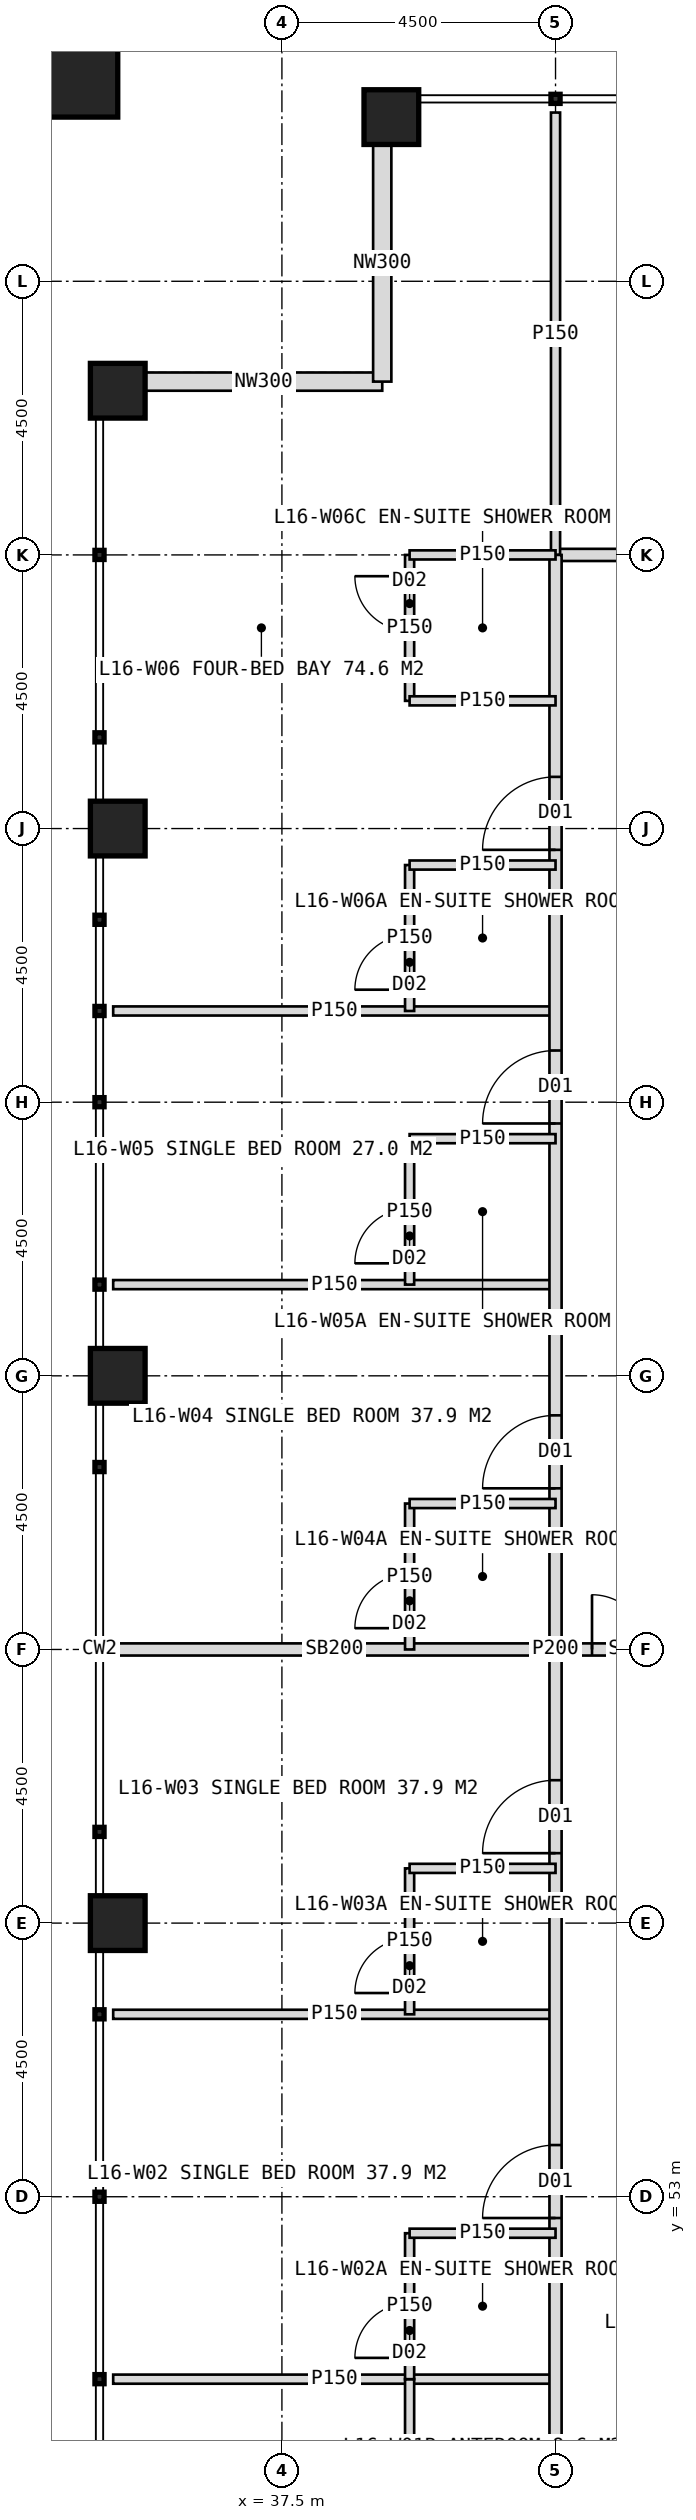
"""IFC4 building model, lengths in metres.
Left out: names, types, materials, properties, quantities, classifications, styles, units other than length and angle.
Written with IfcOpenShell. Run it as: python <this file> out.ifc"""

import sys

from ifc_helpers import new_model, si_unit, direction, frame, frame_2d, origin, origin_2d, place, context, subcontext, project, spatial, rectangle, hollow_rectangle, extrude, element, fill, save


model = new_model("IFC4")
c1 = context("Model", 3, precision=1e-05, world=origin(), true_north=direction((0.0, 1.0)))
c2 = subcontext(c1, "Body", "Model", "MODEL_VIEW")
j1 = project(units=[si_unit("LENGTHUNIT", "METRE"), si_unit("PLANEANGLEUNIT", "RADIAN")], contexts=[c1])
p1 = place(None, origin())
s1 = spatial("IfcSite", under=j1, at=p1, CompositionType="ELEMENT")
p2 = place(p1, origin())
s2 = spatial("IfcBuilding", under=s1, at=p2, CompositionType="ELEMENT")
p3 = place(p2, frame((0.0, 0.0, 71.0)))
s3 = spatial("IfcBuildingStorey", under=s2, at=p3, CompositionType="ELEMENT", Elevation=71.0)
for number, where, z_axis, x_axis in (
    (1, (39.3, 87.2, 0.0), (0.0, 0.0, 1.0), (1.0, 0.0, 0.0)),
    (2, (34.8, 57.5, 0.0), (0.0, 0.0, 1.0), (1.0, 0.0, 0.0)),
    (3, (34.8, 66.5, 0.0), (0.0, 0.0, 1.0), (1.0, 0.0, 0.0)),
    (4, (34.8, 75.5, 0.0), (0.0, 0.0, 1.0), (1.0, 0.0, 0.0)),
    (5, (34.8, 82.7, 0.0), (0.0, 0.0, 1.0), (1.0, 0.0, 0.0)),
):
    element("IfcColumn", number, at=place(p3, frame(where, z_axis=z_axis, x_axis=x_axis)), inside=s3, PredefinedType="COLUMN", context=c2, shape_type="SweptSolid", body=[
        extrude(hollow_rectangle(XDim=0.9, YDim=0.9, WallThickness=0.08, at=origin_2d()), origin(), (0.0, 0.0, 1.0), 4.0),
    ])
p4 = place(p3, frame((33.9, 88.1, 0.0), z_axis=(0.0, 0.0, 1.0), x_axis=(1.0, 0.0, 0.0)))
e6 = element("IfcColumn", 6, at=p4, inside=s3, PredefinedType="COLUMN", context=c2, shape_type="SweptSolid", body=[
    extrude(hollow_rectangle(XDim=1.8, YDim=1.8, WallThickness=0.1, at=origin_2d()), origin(), (0.0, 0.0, 1.0), 4.0),
])
for number, where, z_axis, x_axis in (
    (7, (35.25, 82.85, 0.0), (0.0, 0.0, 1.0), (1.0, 0.0, 0.0)),
    (8, (39.15, 82.85, 0.0), (0.0, 0.0, 1.0), (0.0, 1.0, 0.0)),
):
    element("IfcWall", number, at=place(p3, frame(where, z_axis=z_axis, x_axis=x_axis)), inside=s3, PredefinedType="ELEMENTEDWALL", context=c2, shape_type="SweptSolid", body=[
        extrude(rectangle(XDim=3.9, YDim=0.3, at=frame_2d((1.95, 0.0))), origin(), (0.0, 0.0, 1.0), 2.95),
    ])
p5 = place(p3, frame((42.0, 80.0, 0.0), z_axis=(0.0, 0.0, 1.0), x_axis=(1.0, 0.0, 0.0)))
e9 = element("IfcWall", 9, at=p5, inside=s3, PredefinedType="PARTITIONING", context=c2, shape_type="SweptSolid", body=[
    extrude(rectangle(XDim=36.0, YDim=0.2, at=frame_2d((18.0, 0.0))), origin(), (0.0, 0.0, 1.0), 3.75),
])
p6 = place(p5, frame((3.9, 0.0, 0.0)))
e10 = element("IfcOpeningElement", 10, at=p6, cuts=e9, PredefinedType="OPENING", context=c2, shape_type="SweptSolid", body=[
    extrude(rectangle(XDim=1.2, YDim=2.2, at=frame_2d((0.6, 1.1))), frame((0.0, 0.11, 0.0), z_axis=(0.0, -1.0, 0.0), x_axis=(1.0, 0.0, 0.0)), (0.0, 0.0, 1.0), 0.22),
])
p7 = place(p5, frame((11.65, 0.0, 0.0)))
e11 = element("IfcOpeningElement", 11, at=p7, cuts=e9, PredefinedType="OPENING", context=c2, shape_type="SweptSolid", body=[
    extrude(rectangle(XDim=1.2, YDim=2.2, at=frame_2d((0.6, 1.1))), frame((0.0, 0.11, 0.0), z_axis=(0.0, -1.0, 0.0), x_axis=(1.0, 0.0, 0.0)), (0.0, 0.0, 1.0), 0.22),
])
p8 = place(p5, frame((17.65, 0.0, 0.0)))
e12 = element("IfcOpeningElement", 12, at=p8, cuts=e9, PredefinedType="OPENING", context=c2, shape_type="SweptSolid", body=[
    extrude(rectangle(XDim=1.2, YDim=2.2, at=frame_2d((0.6, 1.1))), frame((0.0, 0.11, 0.0), z_axis=(0.0, -1.0, 0.0), x_axis=(1.0, 0.0, 0.0)), (0.0, 0.0, 1.0), 0.22),
])
p9 = place(p5, frame((23.65, 0.0, 0.0)))
e13 = element("IfcOpeningElement", 13, at=p9, cuts=e9, PredefinedType="OPENING", context=c2, shape_type="SweptSolid", body=[
    extrude(rectangle(XDim=1.2, YDim=2.2, at=frame_2d((0.6, 1.1))), frame((0.0, 0.11, 0.0), z_axis=(0.0, -1.0, 0.0), x_axis=(1.0, 0.0, 0.0)), (0.0, 0.0, 1.0), 0.22),
])
p10 = place(p5, frame((29.65, 0.0, 0.0)))
e14 = element("IfcOpeningElement", 14, at=p10, cuts=e9, PredefinedType="OPENING", context=c2, shape_type="SweptSolid", body=[
    extrude(rectangle(XDim=1.2, YDim=2.2, at=frame_2d((0.6, 1.1))), frame((0.0, 0.11, 0.0), z_axis=(0.0, -1.0, 0.0), x_axis=(1.0, 0.0, 0.0)), (0.0, 0.0, 1.0), 0.22),
])
for number, where, z_axis, x_axis in (
    (15, (42.0, 80.0, 0.0), (0.0, 0.0, 1.0), (0.0, 1.0, 0.0)),
    (16, (42.0, 50.0, 0.0), (0.0, 0.0, 1.0), (-1.0, 0.0, 0.0)),
    (17, (42.0, 56.0, 0.0), (0.0, 0.0, 1.0), (-1.0, 0.0, 0.0)),
):
    element("IfcWall", number, at=place(p3, frame(where, z_axis=z_axis, x_axis=x_axis)), inside=s3, PredefinedType="PARTITIONING", context=c2, shape_type="SweptSolid", body=[
        extrude(rectangle(XDim=7.275, YDim=0.15, at=frame_2d((3.637, 0.0))), origin(), (0.0, 0.0, 1.0), 3.75),
    ])
p11 = place(p3, frame((42.0, 62.0, 0.0), z_axis=(0.0, 0.0, 1.0), x_axis=(-1.0, 0.0, 0.0)))
e18 = element("IfcWall", 18, at=p11, inside=s3, PredefinedType="SOLIDWALL", context=c2, shape_type="SweptSolid", body=[
    extrude(rectangle(XDim=7.275, YDim=0.2, at=frame_2d((3.637, 0.0))), origin(), (0.0, 0.0, 1.0), 2.75),
])
for number, where, z_axis, x_axis in (
    (19, (42.0, 68.0, 0.0), (0.0, 0.0, 1.0), (-1.0, 0.0, 0.0)),
    (20, (42.0, 72.5, 0.0), (0.0, 0.0, 1.0), (-1.0, 0.0, 0.0)),
):
    element("IfcWall", number, at=place(p3, frame(where, z_axis=z_axis, x_axis=x_axis)), inside=s3, PredefinedType="PARTITIONING", context=c2, shape_type="SweptSolid", body=[
        extrude(rectangle(XDim=7.275, YDim=0.15, at=frame_2d((3.637, 0.0))), origin(), (0.0, 0.0, 1.0), 3.75),
    ])
p12 = place(p3, frame((42.0, 44.0, 0.0), z_axis=(0.0, 0.0, 1.0), x_axis=(0.0, 1.0, 0.0)))
e21 = element("IfcWall", 21, at=p12, inside=s3, PredefinedType="PARTITIONING", context=c2, shape_type="SweptSolid", body=[
    extrude(rectangle(XDim=36.0, YDim=0.2, at=frame_2d((18.0, 0.0))), origin(), (0.0, 0.0, 1.0), 3.75),
])
p13 = place(p12, frame((2.65, 0.0, 0.0)))
e22 = element("IfcOpeningElement", 22, at=p13, cuts=e21, PredefinedType="OPENING", context=c2, shape_type="SweptSolid", body=[
    extrude(rectangle(XDim=1.2, YDim=2.2, at=frame_2d((0.6, 1.1))), frame((0.0, 0.11, 0.0), z_axis=(0.0, -1.0, 0.0), x_axis=(1.0, 0.0, 0.0)), (0.0, 0.0, 1.0), 0.22),
])
p14 = place(p12, frame((8.65, 0.0, 0.0)))
e23 = element("IfcOpeningElement", 23, at=p14, cuts=e21, PredefinedType="OPENING", context=c2, shape_type="SweptSolid", body=[
    extrude(rectangle(XDim=1.2, YDim=2.2, at=frame_2d((0.6, 1.1))), frame((0.0, 0.11, 0.0), z_axis=(0.0, -1.0, 0.0), x_axis=(1.0, 0.0, 0.0)), (0.0, 0.0, 1.0), 0.22),
])
p15 = place(p12, frame((14.65, 0.0, 0.0)))
e24 = element("IfcOpeningElement", 24, at=p15, cuts=e21, PredefinedType="OPENING", context=c2, shape_type="SweptSolid", body=[
    extrude(rectangle(XDim=1.2, YDim=2.2, at=frame_2d((0.6, 1.1))), frame((0.0, 0.11, 0.0), z_axis=(0.0, -1.0, 0.0), x_axis=(1.0, 0.0, 0.0)), (0.0, 0.0, 1.0), 0.22),
])
p16 = place(p12, frame((20.65, 0.0, 0.0)))
e25 = element("IfcOpeningElement", 25, at=p16, cuts=e21, PredefinedType="OPENING", context=c2, shape_type="SweptSolid", body=[
    extrude(rectangle(XDim=1.2, YDim=2.2, at=frame_2d((0.6, 1.1))), frame((0.0, 0.11, 0.0), z_axis=(0.0, -1.0, 0.0), x_axis=(1.0, 0.0, 0.0)), (0.0, 0.0, 1.0), 0.22),
])
p17 = place(p12, frame((26.65, 0.0, 0.0)))
e26 = element("IfcOpeningElement", 26, at=p17, cuts=e21, PredefinedType="OPENING", context=c2, shape_type="SweptSolid", body=[
    extrude(rectangle(XDim=1.2, YDim=2.2, at=frame_2d((0.6, 1.1))), frame((0.0, 0.11, 0.0), z_axis=(0.0, -1.0, 0.0), x_axis=(1.0, 0.0, 0.0)), (0.0, 0.0, 1.0), 0.22),
])
p18 = place(p12, frame((31.15, 0.0, 0.0)))
e27 = element("IfcOpeningElement", 27, at=p18, cuts=e21, PredefinedType="OPENING", context=c2, shape_type="SweptSolid", body=[
    extrude(rectangle(XDim=1.2, YDim=2.2, at=frame_2d((0.6, 1.1))), frame((0.0, 0.11, 0.0), z_axis=(0.0, -1.0, 0.0), x_axis=(1.0, 0.0, 0.0)), (0.0, 0.0, 1.0), 0.22),
])
p19 = place(p3, frame((39.6, 46.4, 0.0), z_axis=(0.0, 0.0, 1.0), x_axis=(0.0, 1.0, 0.0)))
e28 = element("IfcWall", 28, at=p19, inside=s3, PredefinedType="PARTITIONING", context=c2, shape_type="SweptSolid", body=[
    extrude(rectangle(XDim=3.6, YDim=0.15, at=frame_2d((1.8, 0.0))), origin(), (0.0, 0.0, 1.0), 3.75),
])
p20 = place(p19, frame((0.25, 0.0, 0.0)))
e29 = element("IfcOpeningElement", 29, at=p20, cuts=e28, PredefinedType="OPENING", context=c2, shape_type="SweptSolid", body=[
    extrude(rectangle(XDim=1.2, YDim=2.2, at=frame_2d((0.6, 1.1))), frame((0.0, 0.085, 0.0), z_axis=(0.0, -1.0, 0.0), x_axis=(1.0, 0.0, 0.0)), (0.0, 0.0, 1.0), 0.17),
])
p21 = place(p3, frame((39.6, 50.0, 0.0), z_axis=(0.0, 0.0, 1.0), x_axis=(0.0, 1.0, 0.0)))
e30 = element("IfcWall", 30, at=p21, inside=s3, PredefinedType="PARTITIONING", context=c2, shape_type="SweptSolid", body=[
    extrude(rectangle(XDim=2.4, YDim=0.15, at=frame_2d((1.2, 0.0))), origin(), (0.0, 0.0, 1.0), 3.75),
])
p22 = place(p21, frame((0.35, 0.0, 0.0)))
e31 = element("IfcOpeningElement", 31, at=p22, cuts=e30, PredefinedType="OPENING", context=c2, shape_type="SweptSolid", body=[
    extrude(rectangle(XDim=0.9, YDim=2.1, at=frame_2d((0.45, 1.05))), frame((0.0, 0.085, 0.0), z_axis=(0.0, -1.0, 0.0), x_axis=(1.0, 0.0, 0.0)), (0.0, 0.0, 1.0), 0.17),
])
p23 = place(p3, frame((42.0, 52.4, 0.0), z_axis=(0.0, 0.0, 1.0), x_axis=(-1.0, 0.0, 0.0)))
e32 = element("IfcWall", 32, at=p23, inside=s3, PredefinedType="PARTITIONING", context=c2, shape_type="SweptSolid", body=[
    extrude(rectangle(XDim=2.4, YDim=0.15, at=frame_2d((1.2, 0.0))), origin(), (0.0, 0.0, 1.0), 3.75),
])
p24 = place(p3, frame((39.6, 56.0, 0.0), z_axis=(0.0, 0.0, 1.0), x_axis=(0.0, 1.0, 0.0)))
e33 = element("IfcWall", 33, at=p24, inside=s3, PredefinedType="PARTITIONING", context=c2, shape_type="SweptSolid", body=[
    extrude(rectangle(XDim=2.4, YDim=0.15, at=frame_2d((1.2, 0.0))), origin(), (0.0, 0.0, 1.0), 3.75),
])
p25 = place(p24, frame((0.35, 0.0, 0.0)))
e34 = element("IfcOpeningElement", 34, at=p25, cuts=e33, PredefinedType="OPENING", context=c2, shape_type="SweptSolid", body=[
    extrude(rectangle(XDim=0.9, YDim=2.1, at=frame_2d((0.45, 1.05))), frame((0.0, 0.085, 0.0), z_axis=(0.0, -1.0, 0.0), x_axis=(1.0, 0.0, 0.0)), (0.0, 0.0, 1.0), 0.17),
])
p26 = place(p3, frame((42.0, 58.4, 0.0), z_axis=(0.0, 0.0, 1.0), x_axis=(-1.0, 0.0, 0.0)))
e35 = element("IfcWall", 35, at=p26, inside=s3, PredefinedType="PARTITIONING", context=c2, shape_type="SweptSolid", body=[
    extrude(rectangle(XDim=2.4, YDim=0.15, at=frame_2d((1.2, 0.0))), origin(), (0.0, 0.0, 1.0), 3.75),
])
p27 = place(p3, frame((39.6, 62.0, 0.0), z_axis=(0.0, 0.0, 1.0), x_axis=(0.0, 1.0, 0.0)))
e36 = element("IfcWall", 36, at=p27, inside=s3, PredefinedType="PARTITIONING", context=c2, shape_type="SweptSolid", body=[
    extrude(rectangle(XDim=2.4, YDim=0.15, at=frame_2d((1.2, 0.0))), origin(), (0.0, 0.0, 1.0), 3.75),
])
p28 = place(p27, frame((0.35, 0.0, 0.0)))
e37 = element("IfcOpeningElement", 37, at=p28, cuts=e36, PredefinedType="OPENING", context=c2, shape_type="SweptSolid", body=[
    extrude(rectangle(XDim=0.9, YDim=2.1, at=frame_2d((0.45, 1.05))), frame((0.0, 0.085, 0.0), z_axis=(0.0, -1.0, 0.0), x_axis=(1.0, 0.0, 0.0)), (0.0, 0.0, 1.0), 0.17),
])
p29 = place(p3, frame((42.0, 64.4, 0.0), z_axis=(0.0, 0.0, 1.0), x_axis=(-1.0, 0.0, 0.0)))
e38 = element("IfcWall", 38, at=p29, inside=s3, PredefinedType="PARTITIONING", context=c2, shape_type="SweptSolid", body=[
    extrude(rectangle(XDim=2.4, YDim=0.15, at=frame_2d((1.2, 0.0))), origin(), (0.0, 0.0, 1.0), 3.75),
])
p30 = place(p3, frame((39.6, 68.0, 0.0), z_axis=(0.0, 0.0, 1.0), x_axis=(0.0, 1.0, 0.0)))
e39 = element("IfcWall", 39, at=p30, inside=s3, PredefinedType="PARTITIONING", context=c2, shape_type="SweptSolid", body=[
    extrude(rectangle(XDim=2.4, YDim=0.15, at=frame_2d((1.2, 0.0))), origin(), (0.0, 0.0, 1.0), 3.75),
])
p31 = place(p30, frame((0.35, 0.0, 0.0)))
e40 = element("IfcOpeningElement", 40, at=p31, cuts=e39, PredefinedType="OPENING", context=c2, shape_type="SweptSolid", body=[
    extrude(rectangle(XDim=0.9, YDim=2.1, at=frame_2d((0.45, 1.05))), frame((0.0, 0.085, 0.0), z_axis=(0.0, -1.0, 0.0), x_axis=(1.0, 0.0, 0.0)), (0.0, 0.0, 1.0), 0.17),
])
p32 = place(p3, frame((42.0, 70.4, 0.0), z_axis=(0.0, 0.0, 1.0), x_axis=(-1.0, 0.0, 0.0)))
e41 = element("IfcWall", 41, at=p32, inside=s3, PredefinedType="PARTITIONING", context=c2, shape_type="SweptSolid", body=[
    extrude(rectangle(XDim=2.4, YDim=0.15, at=frame_2d((1.2, 0.0))), origin(), (0.0, 0.0, 1.0), 3.75),
])
p33 = place(p3, frame((39.6, 72.5, 0.0), z_axis=(0.0, 0.0, 1.0), x_axis=(0.0, 1.0, 0.0)))
e42 = element("IfcWall", 42, at=p33, inside=s3, PredefinedType="PARTITIONING", context=c2, shape_type="SweptSolid", body=[
    extrude(rectangle(XDim=2.4, YDim=0.15, at=frame_2d((1.2, 0.0))), origin(), (0.0, 0.0, 1.0), 3.75),
])
p34 = place(p33, frame((0.35, 0.0, 0.0)))
e43 = element("IfcOpeningElement", 43, at=p34, cuts=e42, PredefinedType="OPENING", context=c2, shape_type="SweptSolid", body=[
    extrude(rectangle(XDim=0.9, YDim=2.1, at=frame_2d((0.45, 1.05))), frame((0.0, 0.085, 0.0), z_axis=(0.0, -1.0, 0.0), x_axis=(1.0, 0.0, 0.0)), (0.0, 0.0, 1.0), 0.17),
])
p35 = place(p3, frame((42.0, 74.9, 0.0), z_axis=(0.0, 0.0, 1.0), x_axis=(-1.0, 0.0, 0.0)))
e44 = element("IfcWall", 44, at=p35, inside=s3, PredefinedType="PARTITIONING", context=c2, shape_type="SweptSolid", body=[
    extrude(rectangle(XDim=2.4, YDim=0.15, at=frame_2d((1.2, 0.0))), origin(), (0.0, 0.0, 1.0), 3.75),
])
p36 = place(p3, frame((39.6, 77.6, 0.0), z_axis=(0.0, 0.0, 1.0), x_axis=(0.0, 1.0, 0.0)))
e45 = element("IfcWall", 45, at=p36, inside=s3, PredefinedType="PARTITIONING", context=c2, shape_type="SweptSolid", body=[
    extrude(rectangle(XDim=2.4, YDim=0.15, at=frame_2d((1.2, 0.0))), origin(), (0.0, 0.0, 1.0), 3.75),
])
p37 = place(p36, frame((1.15, 0.0, 0.0)))
e46 = element("IfcOpeningElement", 46, at=p37, cuts=e45, PredefinedType="OPENING", context=c2, shape_type="SweptSolid", body=[
    extrude(rectangle(XDim=0.9, YDim=2.1, at=frame_2d((0.45, 1.05))), frame((0.0, 0.085, 0.0), z_axis=(0.0, -1.0, 0.0), x_axis=(1.0, 0.0, 0.0)), (0.0, 0.0, 1.0), 0.17),
])
for number, where, z_axis, x_axis in (
    (47, (42.0, 77.6, 0.0), (0.0, 0.0, 1.0), (-1.0, 0.0, 0.0)),
    (48, (42.0, 80.0, 0.0), (0.0, 0.0, 1.0), (-1.0, 0.0, 0.0)),
):
    element("IfcWall", number, at=place(p3, frame(where, z_axis=z_axis, x_axis=x_axis)), inside=s3, PredefinedType="PARTITIONING", context=c2, shape_type="SweptSolid", body=[
        extrude(rectangle(XDim=2.4, YDim=0.15, at=frame_2d((1.2, 0.0))), origin(), (0.0, 0.0, 1.0), 3.75),
    ])
p38 = place(p3, frame((44.7, 62.0, 0.0), z_axis=(0.0, 0.0, 1.0), x_axis=(-1.0, 0.0, 0.0)))
e49 = element("IfcWall", 49, at=p38, inside=s3, PredefinedType="SOLIDWALL", context=c2, shape_type="SweptSolid", body=[
    extrude(rectangle(XDim=2.7, YDim=0.2, at=frame_2d((1.35, 0.0))), origin(), (0.0, 0.0, 1.0), 2.75),
])
p39 = place(p38, frame((0.3, 0.0, 0.0)))
e50 = element("IfcOpeningElement", 50, at=p39, cuts=e49, PredefinedType="OPENING", context=c2, shape_type="SweptSolid", body=[
    extrude(rectangle(XDim=1.8, YDim=2.2, at=frame_2d((0.9, 1.1))), frame((0.0, 0.11, 0.0), z_axis=(0.0, -1.0, 0.0), x_axis=(1.0, 0.0, 0.0)), (0.0, 0.0, 1.0), 0.22),
])
p40 = place(p14, origin())
e51 = element("IfcDoor", 51, at=p40, inside=s3, OperationType="SINGLE_SWING_LEFT", PredefinedType="DOOR", context=c2, shape_type="SweptSolid", body=[
    extrude(rectangle(XDim=1.2, YDim=2.2, at=frame_2d((0.6, 1.1))), frame((0.0, 0.025, 0.0), z_axis=(0.0, -1.0, 0.0), x_axis=(1.0, 0.0, 0.0)), (0.0, 0.0, 1.0), 0.05),
])
fill(e23, e51)
p41 = place(p22, origin())
e52 = element("IfcDoor", 52, at=p41, inside=s3, OperationType="SINGLE_SWING_LEFT", PredefinedType="DOOR", context=c2, shape_type="SweptSolid", body=[
    extrude(rectangle(XDim=0.9, YDim=2.1, at=frame_2d((0.45, 1.05))), frame((0.0, 0.025, 0.0), z_axis=(0.0, -1.0, 0.0), x_axis=(1.0, 0.0, 0.0)), (0.0, 0.0, 1.0), 0.05),
])
fill(e31, e52)
p42 = place(p15, origin())
e53 = element("IfcDoor", 53, at=p42, inside=s3, OperationType="SINGLE_SWING_LEFT", PredefinedType="DOOR", context=c2, shape_type="SweptSolid", body=[
    extrude(rectangle(XDim=1.2, YDim=2.2, at=frame_2d((0.6, 1.1))), frame((0.0, 0.025, 0.0), z_axis=(0.0, -1.0, 0.0), x_axis=(1.0, 0.0, 0.0)), (0.0, 0.0, 1.0), 0.05),
])
fill(e24, e53)
p43 = place(p25, origin())
e54 = element("IfcDoor", 54, at=p43, inside=s3, OperationType="SINGLE_SWING_LEFT", PredefinedType="DOOR", context=c2, shape_type="SweptSolid", body=[
    extrude(rectangle(XDim=0.9, YDim=2.1, at=frame_2d((0.45, 1.05))), frame((0.0, 0.025, 0.0), z_axis=(0.0, -1.0, 0.0), x_axis=(1.0, 0.0, 0.0)), (0.0, 0.0, 1.0), 0.05),
])
fill(e34, e54)
p44 = place(p16, origin())
e55 = element("IfcDoor", 55, at=p44, inside=s3, OperationType="SINGLE_SWING_LEFT", PredefinedType="DOOR", context=c2, shape_type="SweptSolid", body=[
    extrude(rectangle(XDim=1.2, YDim=2.2, at=frame_2d((0.6, 1.1))), frame((0.0, 0.025, 0.0), z_axis=(0.0, -1.0, 0.0), x_axis=(1.0, 0.0, 0.0)), (0.0, 0.0, 1.0), 0.05),
])
fill(e25, e55)
p45 = place(p28, origin())
e56 = element("IfcDoor", 56, at=p45, inside=s3, OperationType="SINGLE_SWING_LEFT", PredefinedType="DOOR", context=c2, shape_type="SweptSolid", body=[
    extrude(rectangle(XDim=0.9, YDim=2.1, at=frame_2d((0.45, 1.05))), frame((0.0, 0.025, 0.0), z_axis=(0.0, -1.0, 0.0), x_axis=(1.0, 0.0, 0.0)), (0.0, 0.0, 1.0), 0.05),
])
fill(e37, e56)
p46 = place(p17, origin())
e57 = element("IfcDoor", 57, at=p46, inside=s3, OperationType="SINGLE_SWING_LEFT", PredefinedType="DOOR", context=c2, shape_type="SweptSolid", body=[
    extrude(rectangle(XDim=1.2, YDim=2.2, at=frame_2d((0.6, 1.1))), frame((0.0, 0.025, 0.0), z_axis=(0.0, -1.0, 0.0), x_axis=(1.0, 0.0, 0.0)), (0.0, 0.0, 1.0), 0.05),
])
fill(e26, e57)
p47 = place(p31, origin())
e58 = element("IfcDoor", 58, at=p47, inside=s3, OperationType="SINGLE_SWING_LEFT", PredefinedType="DOOR", context=c2, shape_type="SweptSolid", body=[
    extrude(rectangle(XDim=0.9, YDim=2.1, at=frame_2d((0.45, 1.05))), frame((0.0, 0.025, 0.0), z_axis=(0.0, -1.0, 0.0), x_axis=(1.0, 0.0, 0.0)), (0.0, 0.0, 1.0), 0.05),
])
fill(e40, e58)
p48 = place(p18, origin())
e59 = element("IfcDoor", 59, at=p48, inside=s3, OperationType="SINGLE_SWING_LEFT", PredefinedType="DOOR", context=c2, shape_type="SweptSolid", body=[
    extrude(rectangle(XDim=1.2, YDim=2.2, at=frame_2d((0.6, 1.1))), frame((0.0, 0.025, 0.0), z_axis=(0.0, -1.0, 0.0), x_axis=(1.0, 0.0, 0.0)), (0.0, 0.0, 1.0), 0.05),
])
fill(e27, e59)
p49 = place(p34, origin())
e60 = element("IfcDoor", 60, at=p49, inside=s3, OperationType="SINGLE_SWING_LEFT", PredefinedType="DOOR", context=c2, shape_type="SweptSolid", body=[
    extrude(rectangle(XDim=0.9, YDim=2.1, at=frame_2d((0.45, 1.05))), frame((0.0, 0.025, 0.0), z_axis=(0.0, -1.0, 0.0), x_axis=(1.0, 0.0, 0.0)), (0.0, 0.0, 1.0), 0.05),
])
fill(e43, e60)
p50 = place(p37, origin())
e61 = element("IfcDoor", 61, at=p50, inside=s3, OperationType="SINGLE_SWING_RIGHT", PredefinedType="DOOR", context=c2, shape_type="SweptSolid", body=[
    extrude(rectangle(XDim=0.9, YDim=2.1, at=frame_2d((0.45, 1.05))), frame((0.0, 0.025, 0.0), z_axis=(0.0, -1.0, 0.0), x_axis=(1.0, 0.0, 0.0)), (0.0, 0.0, 1.0), 0.05),
])
fill(e46, e61)
p51 = place(p39, origin())
e62 = element("IfcDoor", 62, at=p51, inside=s3, OperationType="DOUBLE_DOOR_DOUBLE_SWING", PredefinedType="DOOR", context=c2, shape_type="SweptSolid", body=[
    extrude(rectangle(XDim=1.8, YDim=2.2, at=frame_2d((0.9, 1.1))), frame((0.0, 0.025, 0.0), z_axis=(0.0, -1.0, 0.0), x_axis=(1.0, 0.0, 0.0)), (0.0, 0.0, 1.0), 0.05),
])
fill(e50, e62)
save(model, sys.argv[1])
